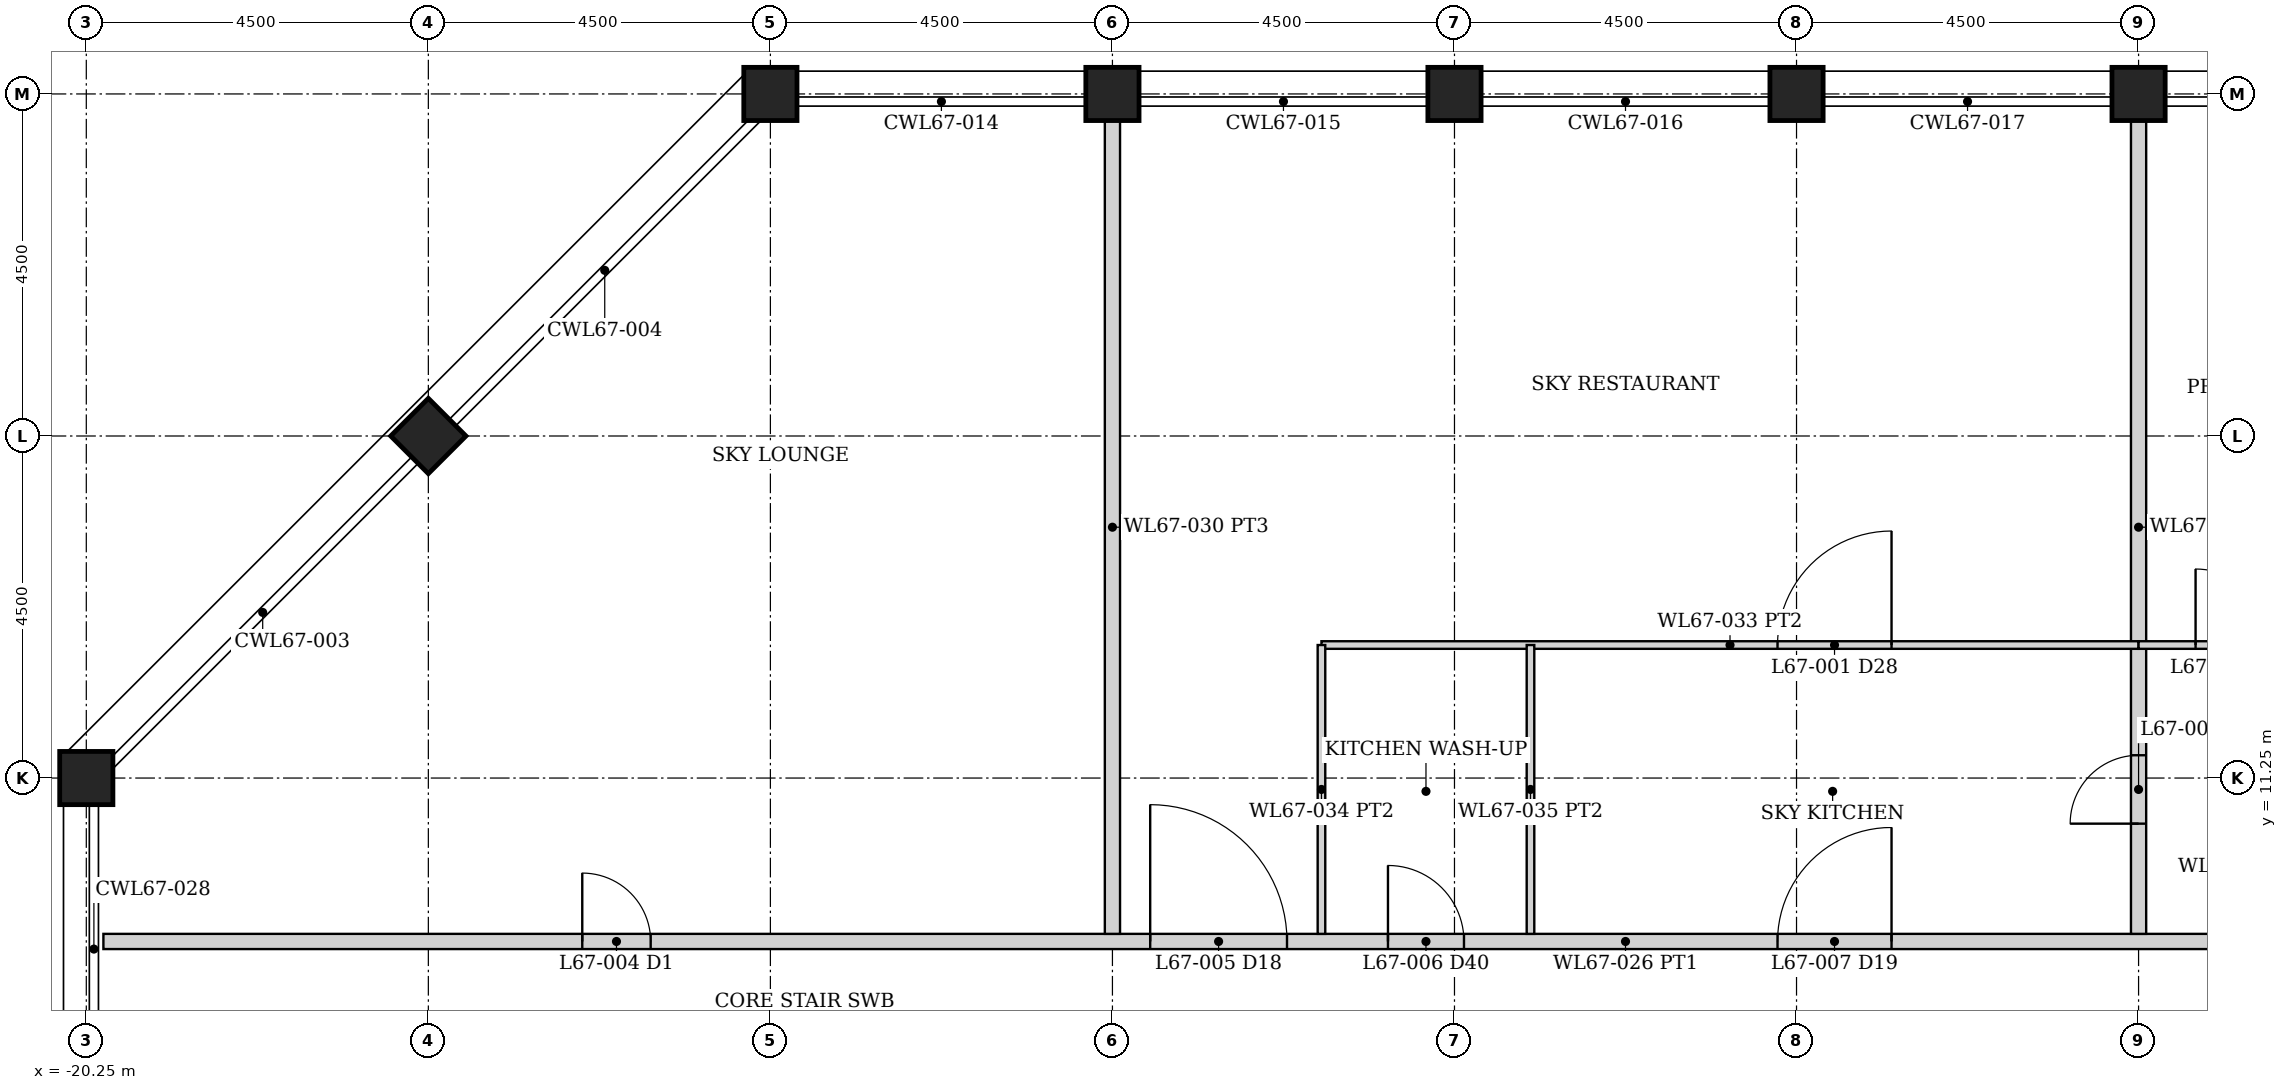
"""IFC4 building model, lengths in metres.
Left out: names, types, materials, properties, quantities, classifications, styles, units other than length and angle.
Written with IfcOpenShell. Run it as: python <this file> out.ifc"""

import sys

from ifc_helpers import new_model, si_unit, direction, frame, frame_2d, origin, origin_2d, place, context, subcontext, project, spatial, rectangle, hollow_rectangle, extrude, element, fill, save


model = new_model("IFC4")
c1 = context("Model", 3, precision=1e-05, world=origin(), true_north=direction((0.0, 1.0)))
c2 = subcontext(c1, "Body", "Model", "MODEL_VIEW")
j1 = project(units=[si_unit("LENGTHUNIT", "METRE"), si_unit("PLANEANGLEUNIT", "RADIAN")], contexts=[c1])
p1 = place(None, origin())
s1 = spatial("IfcSite", under=j1, at=p1, CompositionType="ELEMENT")
p2 = place(p1, origin())
s2 = spatial("IfcBuilding", under=s1, at=p2, CompositionType="ELEMENT")
p3 = place(p2, frame((0.0, 0.0, 257.05)))
s3 = spatial("IfcBuildingStorey", under=s2, at=p3, CompositionType="ELEMENT", Elevation=257.05)
for number, where, z_axis, x_axis in (
    (1, (-11.25, 20.25, 0.0), (0.0, 0.0, 1.0), (0.0, 1.0, 0.0)),
    (2, (-6.75, 20.25, 0.0), (0.0, 0.0, 1.0), (0.0, 1.0, 0.0)),
    (3, (-2.25, 20.25, 0.0), (0.0, 0.0, 1.0), (0.0, 1.0, 0.0)),
    (4, (2.25, 20.25, 0.0), (0.0, 0.0, 1.0), (0.0, 1.0, 0.0)),
    (5, (6.75, 20.25, 0.0), (0.0, 0.0, 1.0), (0.0, 1.0, 0.0)),
    (6, (-20.25, 11.25, 0.0), (0.0, 0.0, 1.0), (1.0, 0.0, 0.0)),
    (7, (-15.75, 15.75, 0.0), (0.0, 0.0, 1.0), (0.707, -0.707, 0.0)),
):
    element("IfcColumn", number, at=place(p3, frame(where, z_axis=z_axis, x_axis=x_axis)), inside=s3, PredefinedType="COLUMN", context=c2, shape_type="SweptSolid", body=[
        extrude(hollow_rectangle(XDim=0.7, YDim=0.7, WallThickness=0.035, at=origin_2d()), origin(), (0.0, 0.0, 1.0), 5.0),
    ])
p4 = place(p3, frame((-20.025, 9.1, 0.0), z_axis=(0.0, 0.0, 1.0), x_axis=(1.0, 0.0, 0.0)))
e8 = element("IfcWall", 8, at=p4, inside=s3, PredefinedType="PARTITIONING", context=c2, shape_type="SweptSolid", body=[
    extrude(rectangle(XDim=40.05, YDim=0.2, at=frame_2d((20.025, 0.0))), origin(), (0.0, 0.0, 1.0), 3.823),
])
p5 = place(p4, frame((6.3, 0.0, 0.0)))
e9 = element("IfcOpeningElement", 9, at=p5, cuts=e8, PredefinedType="OPENING", context=c2, shape_type="SweptSolid", body=[
    extrude(rectangle(XDim=0.9, YDim=2.1, at=frame_2d((0.45, 1.05))), frame((0.0, 0.11, 0.0), z_axis=(0.0, -1.0, 0.0), x_axis=(1.0, 0.0, 0.0)), (0.0, 0.0, 1.0), 0.22),
])
p6 = place(p4, frame((13.772, 0.0, 0.0)))
e10 = element("IfcOpeningElement", 10, at=p6, cuts=e8, PredefinedType="OPENING", context=c2, shape_type="SweptSolid", body=[
    extrude(rectangle(XDim=1.8, YDim=2.1, at=frame_2d((0.9, 1.05))), frame((0.0, 0.11, 0.0), z_axis=(0.0, -1.0, 0.0), x_axis=(1.0, 0.0, 0.0)), (0.0, 0.0, 1.0), 0.22),
])
p7 = place(p4, frame((16.9, 0.0, 0.0)))
e11 = element("IfcOpeningElement", 11, at=p7, cuts=e8, PredefinedType="OPENING", context=c2, shape_type="SweptSolid", body=[
    extrude(rectangle(XDim=1.0, YDim=2.1, at=frame_2d((0.5, 1.05))), frame((0.0, 0.11, 0.0), z_axis=(0.0, -1.0, 0.0), x_axis=(1.0, 0.0, 0.0)), (0.0, 0.0, 1.0), 0.22),
])
p8 = place(p4, frame((22.025, 0.0, 0.0)))
e12 = element("IfcOpeningElement", 12, at=p8, cuts=e8, PredefinedType="OPENING", context=c2, shape_type="SweptSolid", body=[
    extrude(rectangle(XDim=1.5, YDim=2.1, at=frame_2d((0.75, 1.05))), frame((0.0, 0.11, 0.0), z_axis=(0.0, -1.0, 0.0), x_axis=(1.0, 0.0, 0.0)), (0.0, 0.0, 1.0), 0.22),
])
p9 = place(p4, frame((29.779, 0.0, 0.0)))
e13 = element("IfcOpeningElement", 13, at=p9, cuts=e8, PredefinedType="OPENING", context=c2, shape_type="SweptSolid", body=[
    extrude(rectangle(XDim=0.9, YDim=2.1, at=frame_2d((0.45, 1.05))), frame((0.0, 0.11, 0.0), z_axis=(0.0, -1.0, 0.0), x_axis=(1.0, 0.0, 0.0)), (0.0, 0.0, 1.0), 0.22),
])
p10 = place(p4, frame((36.436, 0.0, 0.0)))
e14 = element("IfcOpeningElement", 14, at=p10, cuts=e8, PredefinedType="OPENING", context=c2, shape_type="SweptSolid", body=[
    extrude(rectangle(XDim=0.9, YDim=2.1, at=frame_2d((0.45, 1.05))), frame((0.0, 0.11, 0.0), z_axis=(0.0, -1.0, 0.0), x_axis=(1.0, 0.0, 0.0)), (0.0, 0.0, 1.0), 0.22),
])
p11 = place(p4, frame((32.15, 0.0, 0.0)))
e15 = element("IfcOpeningElement", 15, at=p11, cuts=e8, PredefinedType="OPENING", context=c2, shape_type="SweptSolid", body=[
    extrude(rectangle(XDim=1.0, YDim=2.1, at=frame_2d((0.5, 1.05))), frame((0.0, 0.11, 0.0), z_axis=(0.0, -1.0, 0.0), x_axis=(1.0, 0.0, 0.0)), (0.0, 0.0, 1.0), 0.22),
])
p12 = place(p3, frame((-6.75, 9.2, 0.0), z_axis=(0.0, 0.0, 1.0), x_axis=(0.0, 1.0, 0.0)))
e16 = element("IfcWall", 16, at=p12, inside=s3, PredefinedType="PARTITIONING", context=c2, shape_type="SweptSolid", body=[
    extrude(rectangle(XDim=10.7, YDim=0.2, at=frame_2d((5.35, 0.0))), origin(), (0.0, 0.0, 1.0), 3.823),
])
p13 = place(p3, frame((6.75, 9.2, 0.0), z_axis=(0.0, 0.0, 1.0), x_axis=(0.0, 1.0, 0.0)))
e17 = element("IfcWall", 17, at=p13, inside=s3, PredefinedType="PARTITIONING", context=c2, shape_type="SweptSolid", body=[
    extrude(rectangle(XDim=10.7, YDim=0.2, at=frame_2d((5.35, 0.0))), origin(), (0.0, 0.0, 1.0), 3.823),
])
p14 = place(p13, frame((1.45, 0.0, 0.0)))
e18 = element("IfcOpeningElement", 18, at=p14, cuts=e17, PredefinedType="OPENING", context=c2, shape_type="SweptSolid", body=[
    extrude(rectangle(XDim=0.9, YDim=2.1, at=frame_2d((0.45, 1.05))), frame((0.0, 0.11, 0.0), z_axis=(0.0, -1.0, 0.0), x_axis=(1.0, 0.0, 0.0)), (0.0, 0.0, 1.0), 0.22),
])
p15 = place(p3, frame((-4.0, 13.0, 0.0), z_axis=(0.0, 0.0, 1.0), x_axis=(1.0, 0.0, 0.0)))
e19 = element("IfcWall", 19, at=p15, inside=s3, PredefinedType="PARTITIONING", context=c2, shape_type="SweptSolid", body=[
    extrude(rectangle(XDim=10.75, YDim=0.1, at=frame_2d((5.375, 0.0))), origin(), (0.0, 0.0, 1.0), 3.823),
])
p16 = place(p15, frame((6.0, 0.0, 0.0)))
e20 = element("IfcOpeningElement", 20, at=p16, cuts=e19, PredefinedType="OPENING", context=c2, shape_type="SweptSolid", body=[
    extrude(rectangle(XDim=1.5, YDim=2.1, at=frame_2d((0.75, 1.05))), frame((0.0, 0.06, 0.0), z_axis=(0.0, -1.0, 0.0), x_axis=(1.0, 0.0, 0.0)), (0.0, 0.0, 1.0), 0.12),
])
for number, where, z_axis, x_axis in (
    (21, (-4.0, 9.2, 0.0), (0.0, 0.0, 1.0), (0.0, 1.0, 0.0)),
    (22, (-1.25, 9.2, 0.0), (0.0, 0.0, 1.0), (0.0, 1.0, 0.0)),
):
    element("IfcWall", number, at=place(p3, frame(where, z_axis=z_axis, x_axis=x_axis)), inside=s3, PredefinedType="PARTITIONING", context=c2, shape_type="SweptSolid", body=[
        extrude(rectangle(XDim=3.8, YDim=0.1, at=frame_2d((1.9, 0.0))), origin(), (0.0, 0.0, 1.0), 3.823),
    ])
p17 = place(p3, frame((6.75, 13.0, 0.0), z_axis=(0.0, 0.0, 1.0), x_axis=(1.0, 0.0, 0.0)))
e23 = element("IfcWall", 23, at=p17, inside=s3, PredefinedType="PARTITIONING", context=c2, shape_type="SweptSolid", body=[
    extrude(rectangle(XDim=2.5, YDim=0.1, at=frame_2d((1.25, 0.0))), origin(), (0.0, 0.0, 1.0), 3.823),
])
p18 = place(p17, frame((0.75, 0.0, 0.0)))
e24 = element("IfcOpeningElement", 24, at=p18, cuts=e23, PredefinedType="OPENING", context=c2, shape_type="SweptSolid", body=[
    extrude(rectangle(XDim=1.0, YDim=2.1, at=frame_2d((0.5, 1.05))), frame((0.0, 0.06, 0.0), z_axis=(0.0, -1.0, 0.0), x_axis=(1.0, 0.0, 0.0)), (0.0, 0.0, 1.0), 0.12),
])
p19 = place(p5, origin())
e25 = element("IfcDoor", 25, at=p19, inside=s3, OperationType="SINGLE_SWING_LEFT", PredefinedType="DOOR", context=c2, shape_type="SweptSolid", body=[
    extrude(rectangle(XDim=0.9, YDim=2.1, at=frame_2d((0.45, 1.05))), frame((0.0, 0.025, 0.0), z_axis=(0.0, -1.0, 0.0), x_axis=(1.0, 0.0, 0.0)), (0.0, 0.0, 1.0), 0.05),
])
fill(e9, e25)
p20 = place(p6, origin())
e26 = element("IfcDoor", 26, at=p20, inside=s3, OperationType="SINGLE_SWING_LEFT", PredefinedType="DOOR", context=c2, shape_type="SweptSolid", body=[
    extrude(rectangle(XDim=1.8, YDim=2.1, at=frame_2d((0.9, 1.05))), frame((0.0, 0.025, 0.0), z_axis=(0.0, -1.0, 0.0), x_axis=(1.0, 0.0, 0.0)), (0.0, 0.0, 1.0), 0.05),
])
fill(e10, e26)
p21 = place(p7, origin())
e27 = element("IfcDoor", 27, at=p21, inside=s3, OperationType="SINGLE_SWING_LEFT", PredefinedType="DOOR", context=c2, shape_type="SweptSolid", body=[
    extrude(rectangle(XDim=1.0, YDim=2.1, at=frame_2d((0.5, 1.05))), frame((0.0, 0.025, 0.0), z_axis=(0.0, -1.0, 0.0), x_axis=(1.0, 0.0, 0.0)), (0.0, 0.0, 1.0), 0.05),
])
fill(e11, e27)
p22 = place(p16, origin())
e28 = element("IfcDoor", 28, at=p22, inside=s3, OperationType="SINGLE_SWING_RIGHT", PredefinedType="DOOR", context=c2, shape_type="SweptSolid", body=[
    extrude(rectangle(XDim=1.5, YDim=2.1, at=frame_2d((0.75, 1.05))), frame((0.0, 0.025, 0.0), z_axis=(0.0, -1.0, 0.0), x_axis=(1.0, 0.0, 0.0)), (0.0, 0.0, 1.0), 0.05),
])
fill(e20, e28)
p23 = place(p8, origin())
e29 = element("IfcDoor", 29, at=p23, inside=s3, OperationType="SINGLE_SWING_RIGHT", PredefinedType="DOOR", context=c2, shape_type="SweptSolid", body=[
    extrude(rectangle(XDim=1.5, YDim=2.1, at=frame_2d((0.75, 1.05))), frame((0.0, 0.025, 0.0), z_axis=(0.0, -1.0, 0.0), x_axis=(1.0, 0.0, 0.0)), (0.0, 0.0, 1.0), 0.05),
])
fill(e12, e29)
p24 = place(p18, origin())
e30 = element("IfcDoor", 30, at=p24, inside=s3, OperationType="SINGLE_SWING_LEFT", PredefinedType="DOOR", context=c2, shape_type="SweptSolid", body=[
    extrude(rectangle(XDim=1.0, YDim=2.1, at=frame_2d((0.5, 1.05))), frame((0.0, 0.025, 0.0), z_axis=(0.0, -1.0, 0.0), x_axis=(1.0, 0.0, 0.0)), (0.0, 0.0, 1.0), 0.05),
])
fill(e24, e30)
p25 = place(p14, origin())
e31 = element("IfcDoor", 31, at=p25, inside=s3, OperationType="SINGLE_SWING_LEFT", PredefinedType="DOOR", context=c2, shape_type="SweptSolid", body=[
    extrude(rectangle(XDim=0.9, YDim=2.1, at=frame_2d((0.45, 1.05))), frame((0.0, 0.025, 0.0), z_axis=(0.0, -1.0, 0.0), x_axis=(1.0, 0.0, 0.0)), (0.0, 0.0, 1.0), 0.05),
])
fill(e18, e31)
save(model, sys.argv[1])
